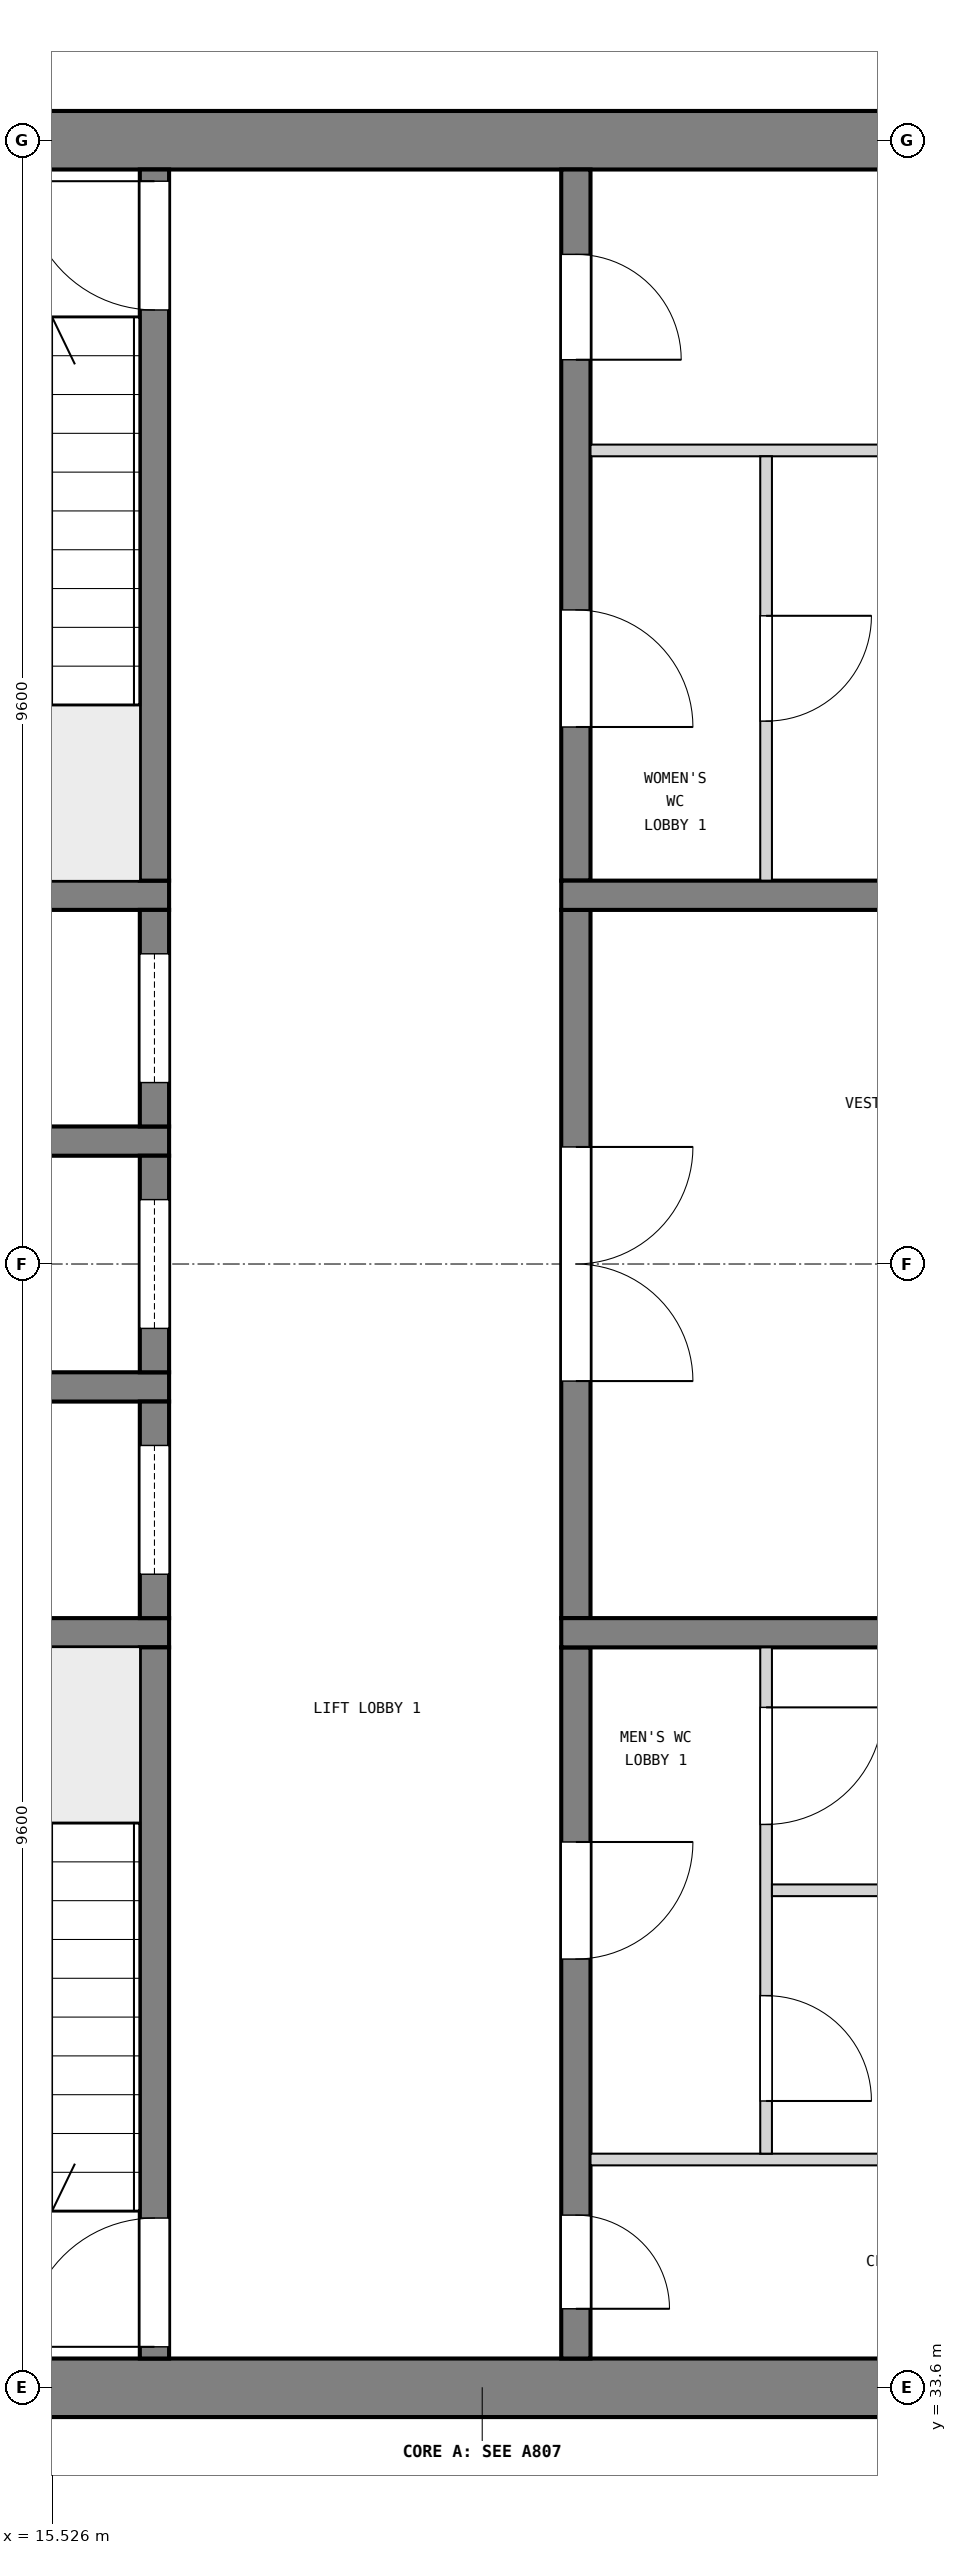
"""IFC4 building model, lengths in metres.
Left out: names, types, materials, properties, quantities, classifications, styles, units other than length and angle.
Written with IfcOpenShell. Run it as: python <this file> out.ifc"""

import sys

from ifc_helpers import new_model, si_unit, direction, frame, frame_2d, origin, place, context, subcontext, project, spatial, rectangle, extrude, element, fill, save


model = new_model("IFC4")
c1 = context("Model", 3, precision=1e-05, world=origin(), true_north=direction((0.0, 1.0)))
c2 = subcontext(c1, "Body", "Model", "MODEL_VIEW")
j1 = project(units=[si_unit("LENGTHUNIT", "METRE"), si_unit("PLANEANGLEUNIT", "RADIAN")], contexts=[c1])
p1 = place(None, origin())
s1 = spatial("IfcSite", under=j1, at=p1, CompositionType="ELEMENT")
p2 = place(p1, origin())
s2 = spatial("IfcBuilding", under=s1, at=p2, CompositionType="ELEMENT")
p3 = place(p2, frame((0.0, 0.0, 21.0)))
s3 = spatial("IfcBuildingStorey", under=s2, at=p3, CompositionType="ELEMENT", Elevation=21.0)
p4 = place(p3, frame((12.55, 52.8, 0.0), z_axis=(0.0, 0.0, 1.0), x_axis=(1.0, 0.0, 0.0)))
e1 = element("IfcWall", 1, at=p4, inside=s3, PredefinedType="SHEAR", context=c2, shape_type="SweptSolid", body=[
    extrude(rectangle(XDim=13.3, YDim=0.5, at=frame_2d((6.65, 0.0))), origin(), (0.0, 0.0, 1.0), 3.9),
])
p5 = place(p4, frame((1.85, 0.0, 1.0)))
e2 = element("IfcOpeningElement", 2, at=p5, cuts=e1, PredefinedType="OPENING", context=c2, shape_type="SweptSolid", body=[
    extrude(rectangle(XDim=0.4, YDim=2.0, at=frame_2d((0.2, 1.0))), frame((0.0, 0.26, 0.0), z_axis=(0.0, -1.0, 0.0), x_axis=(1.0, 0.0, 0.0)), (0.0, 0.0, 1.0), 0.52),
])
p6 = place(p3, frame((12.55, 33.6, 0.0), z_axis=(0.0, 0.0, 1.0), x_axis=(1.0, 0.0, 0.0)))
e3 = element("IfcWall", 3, at=p6, inside=s3, PredefinedType="SHEAR", context=c2, shape_type="SweptSolid", body=[
    extrude(rectangle(XDim=13.3, YDim=0.5, at=frame_2d((6.65, 0.0))), origin(), (0.0, 0.0, 1.0), 3.9),
])
p7 = place(p6, frame((1.85, 0.0, 1.0)))
e4 = element("IfcOpeningElement", 4, at=p7, cuts=e3, PredefinedType="OPENING", context=c2, shape_type="SweptSolid", body=[
    extrude(rectangle(XDim=0.4, YDim=2.0, at=frame_2d((0.2, 1.0))), frame((0.0, 0.26, 0.0), z_axis=(0.0, -1.0, 0.0), x_axis=(1.0, 0.0, 0.0)), (0.0, 0.0, 1.0), 0.52),
])
for number, where, z_axis, x_axis in (
    (5, (13.05, 40.05, 0.0), (0.0, 0.0, 1.0), (1.0, 0.0, 0.0)),
    (6, (13.05, 42.15, 0.0), (0.0, 0.0, 1.0), (1.0, 0.0, 0.0)),
    (7, (13.05, 44.25, 0.0), (0.0, 0.0, 1.0), (1.0, 0.0, 0.0)),
    (8, (13.05, 46.35, 0.0), (0.0, 0.0, 1.0), (1.0, 0.0, 0.0)),
):
    element("IfcWall", number, at=place(p3, frame(where, z_axis=z_axis, x_axis=x_axis)), inside=s3, PredefinedType="SOLIDWALL", context=c2, shape_type="SweptSolid", body=[
        extrude(rectangle(XDim=3.475, YDim=0.25, at=frame_2d((1.737, 0.0))), origin(), (0.0, 0.0, 1.0), 3.6),
    ])
p8 = place(p3, frame((16.4, 33.85, 0.0), z_axis=(0.0, 0.0, 1.0), x_axis=(0.0, 1.0, 0.0)))
e9 = element("IfcWall", 9, at=p8, inside=s3, PredefinedType="SOLIDWALL", context=c2, shape_type="SweptSolid", body=[
    extrude(rectangle(XDim=6.075, YDim=0.25, at=frame_2d((3.038, 0.0))), origin(), (0.0, 0.0, 1.0), 3.6),
])
p9 = place(p8, frame((0.1, 0.0, 0.0)))
e10 = element("IfcOpeningElement", 10, at=p9, cuts=e9, PredefinedType="OPENING", context=c2, shape_type="SweptSolid", body=[
    extrude(rectangle(XDim=1.1, YDim=2.1, at=frame_2d((0.55, 1.05))), frame((0.0, 0.135, 0.0), z_axis=(0.0, -1.0, 0.0), x_axis=(1.0, 0.0, 0.0)), (0.0, 0.0, 1.0), 0.27),
])
p10 = place(p3, frame((16.4, 40.175, 0.0), z_axis=(0.0, 0.0, 1.0), x_axis=(0.0, 1.0, 0.0)))
e11 = element("IfcWall", 11, at=p10, inside=s3, PredefinedType="SOLIDWALL", context=c2, shape_type="SweptSolid", body=[
    extrude(rectangle(XDim=1.85, YDim=0.25, at=frame_2d((0.925, 0.0))), origin(), (0.0, 0.0, 1.0), 3.6),
])
p11 = place(p10, frame((0.375, 0.0, 0.0)))
e12 = element("IfcOpeningElement", 12, at=p11, cuts=e11, PredefinedType="OPENING", context=c2, shape_type="SweptSolid", body=[
    extrude(rectangle(XDim=1.1, YDim=2.1, at=frame_2d((0.55, 1.05))), frame((0.0, 0.135, 0.0), z_axis=(0.0, -1.0, 0.0), x_axis=(1.0, 0.0, 0.0)), (0.0, 0.0, 1.0), 0.27),
])
p12 = place(p3, frame((16.4, 42.275, 0.0), z_axis=(0.0, 0.0, 1.0), x_axis=(0.0, 1.0, 0.0)))
e13 = element("IfcWall", 13, at=p12, inside=s3, PredefinedType="SOLIDWALL", context=c2, shape_type="SweptSolid", body=[
    extrude(rectangle(XDim=1.85, YDim=0.25, at=frame_2d((0.925, 0.0))), origin(), (0.0, 0.0, 1.0), 3.6),
])
p13 = place(p12, frame((0.375, 0.0, 0.0)))
e14 = element("IfcOpeningElement", 14, at=p13, cuts=e13, PredefinedType="OPENING", context=c2, shape_type="SweptSolid", body=[
    extrude(rectangle(XDim=1.1, YDim=2.1, at=frame_2d((0.55, 1.05))), frame((0.0, 0.135, 0.0), z_axis=(0.0, -1.0, 0.0), x_axis=(1.0, 0.0, 0.0)), (0.0, 0.0, 1.0), 0.27),
])
p14 = place(p3, frame((16.4, 44.375, 0.0), z_axis=(0.0, 0.0, 1.0), x_axis=(0.0, 1.0, 0.0)))
e15 = element("IfcWall", 15, at=p14, inside=s3, PredefinedType="SOLIDWALL", context=c2, shape_type="SweptSolid", body=[
    extrude(rectangle(XDim=1.85, YDim=0.25, at=frame_2d((0.925, 0.0))), origin(), (0.0, 0.0, 1.0), 3.6),
])
p15 = place(p14, frame((0.375, 0.0, 0.0)))
e16 = element("IfcOpeningElement", 16, at=p15, cuts=e15, PredefinedType="OPENING", context=c2, shape_type="SweptSolid", body=[
    extrude(rectangle(XDim=1.1, YDim=2.1, at=frame_2d((0.55, 1.05))), frame((0.0, 0.135, 0.0), z_axis=(0.0, -1.0, 0.0), x_axis=(1.0, 0.0, 0.0)), (0.0, 0.0, 1.0), 0.27),
])
p16 = place(p3, frame((16.4, 46.475, 0.0), z_axis=(0.0, 0.0, 1.0), x_axis=(0.0, 1.0, 0.0)))
e17 = element("IfcWall", 17, at=p16, inside=s3, PredefinedType="SOLIDWALL", context=c2, shape_type="SweptSolid", body=[
    extrude(rectangle(XDim=6.075, YDim=0.25, at=frame_2d((3.038, 0.0))), origin(), (0.0, 0.0, 1.0), 3.6),
])
p17 = place(p16, frame((4.875, 0.0, 0.0)))
e18 = element("IfcOpeningElement", 18, at=p17, cuts=e17, PredefinedType="OPENING", context=c2, shape_type="SweptSolid", body=[
    extrude(rectangle(XDim=1.1, YDim=2.1, at=frame_2d((0.55, 1.05))), frame((0.0, 0.135, 0.0), z_axis=(0.0, -1.0, 0.0), x_axis=(1.0, 0.0, 0.0)), (0.0, 0.0, 1.0), 0.27),
])
p18 = place(p3, frame((20.0, 33.85, 0.0), z_axis=(0.0, 0.0, 1.0), x_axis=(0.0, 1.0, 0.0)))
e19 = element("IfcWall", 19, at=p18, inside=s3, PredefinedType="SOLIDWALL", context=c2, shape_type="SweptSolid", body=[
    extrude(rectangle(XDim=6.075, YDim=0.25, at=frame_2d((3.038, 0.0))), origin(), (0.0, 0.0, 1.0), 3.6),
])
p19 = place(p18, frame((0.425, 0.0, 0.0)))
e20 = element("IfcOpeningElement", 20, at=p19, cuts=e19, PredefinedType="OPENING", context=c2, shape_type="SweptSolid", body=[
    extrude(rectangle(XDim=0.8, YDim=2.1, at=frame_2d((0.4, 1.05))), frame((0.0, 0.135, 0.0), z_axis=(0.0, -1.0, 0.0), x_axis=(1.0, 0.0, 0.0)), (0.0, 0.0, 1.0), 0.27),
])
p20 = place(p18, frame((3.413, 0.0, 0.0)))
e21 = element("IfcOpeningElement", 21, at=p20, cuts=e19, PredefinedType="OPENING", context=c2, shape_type="SweptSolid", body=[
    extrude(rectangle(XDim=1.0, YDim=2.1, at=frame_2d((0.5, 1.05))), frame((0.0, 0.135, 0.0), z_axis=(0.0, -1.0, 0.0), x_axis=(1.0, 0.0, 0.0)), (0.0, 0.0, 1.0), 0.27),
])
p21 = place(p3, frame((20.0, 40.175, 0.0), z_axis=(0.0, 0.0, 1.0), x_axis=(0.0, 1.0, 0.0)))
e22 = element("IfcWall", 22, at=p21, inside=s3, PredefinedType="SOLIDWALL", context=c2, shape_type="SweptSolid", body=[
    extrude(rectangle(XDim=6.05, YDim=0.25, at=frame_2d((3.025, 0.0))), origin(), (0.0, 0.0, 1.0), 3.6),
])
p22 = place(p21, frame((2.025, 0.0, 0.0)))
e23 = element("IfcOpeningElement", 23, at=p22, cuts=e22, PredefinedType="OPENING", context=c2, shape_type="SweptSolid", body=[
    extrude(rectangle(XDim=2.0, YDim=2.1, at=frame_2d((1.0, 1.05))), frame((0.0, 0.135, 0.0), z_axis=(0.0, -1.0, 0.0), x_axis=(1.0, 0.0, 0.0)), (0.0, 0.0, 1.0), 0.27),
])
p23 = place(p3, frame((20.0, 46.475, 0.0), z_axis=(0.0, 0.0, 1.0), x_axis=(0.0, 1.0, 0.0)))
e24 = element("IfcWall", 24, at=p23, inside=s3, PredefinedType="SOLIDWALL", context=c2, shape_type="SweptSolid", body=[
    extrude(rectangle(XDim=6.075, YDim=0.25, at=frame_2d((3.038, 0.0))), origin(), (0.0, 0.0, 1.0), 3.6),
])
p24 = place(p23, frame((1.312, 0.0, 0.0)))
e25 = element("IfcOpeningElement", 25, at=p24, cuts=e24, PredefinedType="OPENING", context=c2, shape_type="SweptSolid", body=[
    extrude(rectangle(XDim=1.0, YDim=2.1, at=frame_2d((0.5, 1.05))), frame((0.0, 0.135, 0.0), z_axis=(0.0, -1.0, 0.0), x_axis=(1.0, 0.0, 0.0)), (0.0, 0.0, 1.0), 0.27),
])
p25 = place(p23, frame((4.45, 0.0, 0.0)))
e26 = element("IfcOpeningElement", 26, at=p25, cuts=e24, PredefinedType="OPENING", context=c2, shape_type="SweptSolid", body=[
    extrude(rectangle(XDim=0.9, YDim=2.1, at=frame_2d((0.45, 1.05))), frame((0.0, 0.135, 0.0), z_axis=(0.0, -1.0, 0.0), x_axis=(1.0, 0.0, 0.0)), (0.0, 0.0, 1.0), 0.27),
])
for number, where, z_axis, x_axis in (
    (27, (19.875, 40.05, 0.0), (0.0, 0.0, 1.0), (1.0, 0.0, 0.0)),
    (28, (19.875, 46.35, 0.0), (0.0, 0.0, 1.0), (1.0, 0.0, 0.0)),
):
    element("IfcWall", number, at=place(p3, frame(where, z_axis=z_axis, x_axis=x_axis)), inside=s3, PredefinedType="SOLIDWALL", context=c2, shape_type="SweptSolid", body=[
        extrude(rectangle(XDim=5.475, YDim=0.25, at=frame_2d((2.738, 0.0))), origin(), (0.0, 0.0, 1.0), 3.6),
    ])
p26 = place(p3, frame((20.125, 35.55, 0.0), z_axis=(0.0, 0.0, 1.0), x_axis=(1.0, 0.0, 0.0)))
e29 = element("IfcWall", 29, at=p26, inside=s3, PredefinedType="PARTITIONING", context=c2, shape_type="SweptSolid", body=[
    extrude(rectangle(XDim=5.225, YDim=0.1, at=frame_2d((2.613, 0.0))), origin(), (0.0, 0.0, 1.0), 3.6),
])
p27 = place(p3, frame((21.625, 35.6, 0.0), z_axis=(0.0, 0.0, 1.0), x_axis=(0.0, 1.0, 0.0)))
e30 = element("IfcWall", 30, at=p27, inside=s3, PredefinedType="PARTITIONING", context=c2, shape_type="SweptSolid", body=[
    extrude(rectangle(XDim=4.325, YDim=0.1, at=frame_2d((2.163, 0.0))), origin(), (0.0, 0.0, 1.0), 3.6),
])
p28 = place(p27, frame((0.45, 0.0, 0.0)))
e31 = element("IfcOpeningElement", 31, at=p28, cuts=e30, PredefinedType="OPENING", context=c2, shape_type="SweptSolid", body=[
    extrude(rectangle(XDim=0.9, YDim=2.1, at=frame_2d((0.45, 1.05))), frame((0.0, 0.06, 0.0), z_axis=(0.0, -1.0, 0.0), x_axis=(1.0, 0.0, 0.0)), (0.0, 0.0, 1.0), 0.12),
])
p29 = place(p27, frame((2.812, 0.0, 0.0)))
e32 = element("IfcOpeningElement", 32, at=p29, cuts=e30, PredefinedType="OPENING", context=c2, shape_type="SweptSolid", body=[
    extrude(rectangle(XDim=1.0, YDim=2.1, at=frame_2d((0.5, 1.05))), frame((0.0, 0.06, 0.0), z_axis=(0.0, -1.0, 0.0), x_axis=(1.0, 0.0, 0.0)), (0.0, 0.0, 1.0), 0.12),
])
p30 = place(p3, frame((21.675, 37.85, 0.0), z_axis=(0.0, 0.0, 1.0), x_axis=(1.0, 0.0, 0.0)))
e33 = element("IfcWall", 33, at=p30, inside=s3, PredefinedType="PARTITIONING", context=c2, shape_type="SweptSolid", body=[
    extrude(rectangle(XDim=3.675, YDim=0.1, at=frame_2d((1.837, 0.0))), origin(), (0.0, 0.0, 1.0), 3.6),
])
p31 = place(p3, frame((20.125, 50.15, 0.0), z_axis=(0.0, 0.0, 1.0), x_axis=(1.0, 0.0, 0.0)))
e34 = element("IfcWall", 34, at=p31, inside=s3, PredefinedType="PARTITIONING", context=c2, shape_type="SweptSolid", body=[
    extrude(rectangle(XDim=5.225, YDim=0.1, at=frame_2d((2.613, 0.0))), origin(), (0.0, 0.0, 1.0), 3.6),
])
p32 = place(p3, frame((21.625, 46.475, 0.0), z_axis=(0.0, 0.0, 1.0), x_axis=(0.0, 1.0, 0.0)))
e35 = element("IfcWall", 35, at=p32, inside=s3, PredefinedType="PARTITIONING", context=c2, shape_type="SweptSolid", body=[
    extrude(rectangle(XDim=3.625, YDim=0.1, at=frame_2d((1.812, 0.0))), origin(), (0.0, 0.0, 1.0), 3.6),
])
p33 = place(p32, frame((1.363, 0.0, 0.0)))
e36 = element("IfcOpeningElement", 36, at=p33, cuts=e35, PredefinedType="OPENING", context=c2, shape_type="SweptSolid", body=[
    extrude(rectangle(XDim=0.9, YDim=2.1, at=frame_2d((0.45, 1.05))), frame((0.0, 0.06, 0.0), z_axis=(0.0, -1.0, 0.0), x_axis=(1.0, 0.0, 0.0)), (0.0, 0.0, 1.0), 0.12),
])
p34 = place(p9, origin())
e37 = element("IfcDoor", 37, at=p34, inside=s3, OperationType="SINGLE_SWING_LEFT", PredefinedType="DOOR", context=c2, shape_type="SweptSolid", body=[
    extrude(rectangle(XDim=1.1, YDim=2.1, at=frame_2d((0.55, 1.05))), frame((0.0, 0.025, 0.0), z_axis=(0.0, -1.0, 0.0), x_axis=(1.0, 0.0, 0.0)), (0.0, 0.0, 1.0), 0.05),
])
fill(e10, e37)
p35 = place(p17, origin())
e38 = element("IfcDoor", 38, at=p35, inside=s3, OperationType="SINGLE_SWING_RIGHT", PredefinedType="DOOR", context=c2, shape_type="SweptSolid", body=[
    extrude(rectangle(XDim=1.1, YDim=2.1, at=frame_2d((0.55, 1.05))), frame((0.0, 0.025, 0.0), z_axis=(0.0, -1.0, 0.0), x_axis=(1.0, 0.0, 0.0)), (0.0, 0.0, 1.0), 0.05),
])
fill(e18, e38)
p36 = place(p11, origin())
e39 = element("IfcDoor", 39, at=p36, inside=s3, OperationType="SLIDING_TO_LEFT", PredefinedType="DOOR", context=c2, shape_type="SweptSolid", body=[
    extrude(rectangle(XDim=1.1, YDim=2.1, at=frame_2d((0.55, 1.05))), frame((0.0, 0.025, 0.0), z_axis=(0.0, -1.0, 0.0), x_axis=(1.0, 0.0, 0.0)), (0.0, 0.0, 1.0), 0.05),
])
fill(e12, e39)
p37 = place(p13, origin())
e40 = element("IfcDoor", 40, at=p37, inside=s3, OperationType="SLIDING_TO_LEFT", PredefinedType="DOOR", context=c2, shape_type="SweptSolid", body=[
    extrude(rectangle(XDim=1.1, YDim=2.1, at=frame_2d((0.55, 1.05))), frame((0.0, 0.025, 0.0), z_axis=(0.0, -1.0, 0.0), x_axis=(1.0, 0.0, 0.0)), (0.0, 0.0, 1.0), 0.05),
])
fill(e14, e40)
p38 = place(p15, origin())
e41 = element("IfcDoor", 41, at=p38, inside=s3, OperationType="SLIDING_TO_LEFT", PredefinedType="DOOR", context=c2, shape_type="SweptSolid", body=[
    extrude(rectangle(XDim=1.1, YDim=2.1, at=frame_2d((0.55, 1.05))), frame((0.0, 0.025, 0.0), z_axis=(0.0, -1.0, 0.0), x_axis=(1.0, 0.0, 0.0)), (0.0, 0.0, 1.0), 0.05),
])
fill(e16, e41)
p39 = place(p22, frame((2.0, 0.0, 0.0), z_axis=(0.0, 0.0, 1.0), x_axis=(-1.0, 0.0, 0.0)))
e42 = element("IfcDoor", 42, at=p39, inside=s3, OperationType="DOUBLE_DOOR_SINGLE_SWING", PredefinedType="DOOR", context=c2, shape_type="SweptSolid", body=[
    extrude(rectangle(XDim=2.0, YDim=2.1, at=frame_2d((1.0, 1.05))), frame((0.0, 0.025, 0.0), z_axis=(0.0, -1.0, 0.0), x_axis=(1.0, 0.0, 0.0)), (0.0, 0.0, 1.0), 0.05),
])
fill(e23, e42)
p40 = place(p19, frame((0.8, 0.0, 0.0), z_axis=(0.0, 0.0, 1.0), x_axis=(-1.0, 0.0, 0.0)))
e43 = element("IfcDoor", 43, at=p40, inside=s3, OperationType="SINGLE_SWING_RIGHT", PredefinedType="DOOR", context=c2, shape_type="SweptSolid", body=[
    extrude(rectangle(XDim=0.8, YDim=2.1, at=frame_2d((0.4, 1.05))), frame((0.0, 0.025, 0.0), z_axis=(0.0, -1.0, 0.0), x_axis=(1.0, 0.0, 0.0)), (0.0, 0.0, 1.0), 0.05),
])
fill(e20, e43)
p41 = place(p20, frame((1.0, 0.0, 0.0), z_axis=(0.0, 0.0, 1.0), x_axis=(-1.0, 0.0, 0.0)))
e44 = element("IfcDoor", 44, at=p41, inside=s3, OperationType="SINGLE_SWING_LEFT", PredefinedType="DOOR", context=c2, shape_type="SweptSolid", body=[
    extrude(rectangle(XDim=1.0, YDim=2.1, at=frame_2d((0.5, 1.05))), frame((0.0, 0.025, 0.0), z_axis=(0.0, -1.0, 0.0), x_axis=(1.0, 0.0, 0.0)), (0.0, 0.0, 1.0), 0.05),
])
fill(e21, e44)
p42 = place(p28, frame((0.9, 0.0, 0.0), z_axis=(0.0, 0.0, 1.0), x_axis=(-1.0, 0.0, 0.0)))
e45 = element("IfcDoor", 45, at=p42, inside=s3, OperationType="SINGLE_SWING_RIGHT", PredefinedType="DOOR", context=c2, shape_type="SweptSolid", body=[
    extrude(rectangle(XDim=0.9, YDim=2.1, at=frame_2d((0.45, 1.05))), frame((0.0, 0.025, 0.0), z_axis=(0.0, -1.0, 0.0), x_axis=(1.0, 0.0, 0.0)), (0.0, 0.0, 1.0), 0.05),
])
fill(e31, e45)
p43 = place(p29, frame((1.0, 0.0, 0.0), z_axis=(0.0, 0.0, 1.0), x_axis=(-1.0, 0.0, 0.0)))
e46 = element("IfcDoor", 46, at=p43, inside=s3, OperationType="SINGLE_SWING_LEFT", PredefinedType="DOOR", context=c2, shape_type="SweptSolid", body=[
    extrude(rectangle(XDim=1.0, YDim=2.1, at=frame_2d((0.5, 1.05))), frame((0.0, 0.025, 0.0), z_axis=(0.0, -1.0, 0.0), x_axis=(1.0, 0.0, 0.0)), (0.0, 0.0, 1.0), 0.05),
])
fill(e32, e46)
p44 = place(p24, frame((1.0, 0.0, 0.0), z_axis=(0.0, 0.0, 1.0), x_axis=(-1.0, 0.0, 0.0)))
e47 = element("IfcDoor", 47, at=p44, inside=s3, OperationType="SINGLE_SWING_RIGHT", PredefinedType="DOOR", context=c2, shape_type="SweptSolid", body=[
    extrude(rectangle(XDim=1.0, YDim=2.1, at=frame_2d((0.5, 1.05))), frame((0.0, 0.025, 0.0), z_axis=(0.0, -1.0, 0.0), x_axis=(1.0, 0.0, 0.0)), (0.0, 0.0, 1.0), 0.05),
])
fill(e25, e47)
p45 = place(p33, frame((0.9, 0.0, 0.0), z_axis=(0.0, 0.0, 1.0), x_axis=(-1.0, 0.0, 0.0)))
e48 = element("IfcDoor", 48, at=p45, inside=s3, OperationType="SINGLE_SWING_LEFT", PredefinedType="DOOR", context=c2, shape_type="SweptSolid", body=[
    extrude(rectangle(XDim=0.9, YDim=2.1, at=frame_2d((0.45, 1.05))), frame((0.0, 0.025, 0.0), z_axis=(0.0, -1.0, 0.0), x_axis=(1.0, 0.0, 0.0)), (0.0, 0.0, 1.0), 0.05),
])
fill(e36, e48)
p46 = place(p25, frame((0.9, 0.0, 0.0), z_axis=(0.0, 0.0, 1.0), x_axis=(-1.0, 0.0, 0.0)))
e49 = element("IfcDoor", 49, at=p46, inside=s3, OperationType="SINGLE_SWING_RIGHT", PredefinedType="DOOR", context=c2, shape_type="SweptSolid", body=[
    extrude(rectangle(XDim=0.9, YDim=2.1, at=frame_2d((0.45, 1.05))), frame((0.0, 0.025, 0.0), z_axis=(0.0, -1.0, 0.0), x_axis=(1.0, 0.0, 0.0)), (0.0, 0.0, 1.0), 0.05),
])
fill(e26, e49)
save(model, sys.argv[1])
